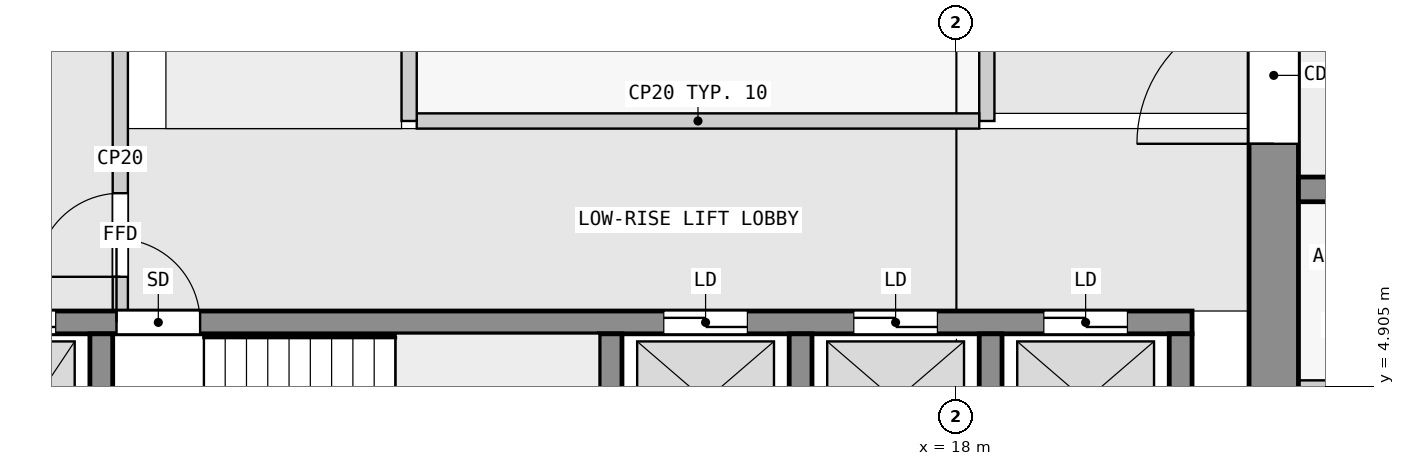
"""IFC4 building model, lengths in metres.
Left out: names, types, materials, properties, quantities, classifications, styles, units other than length and angle.
Written with IfcOpenShell. Run it as: python <this file> out.ifc"""

import sys

from ifc_helpers import new_model, si_unit, direction, frame, frame_2d, origin, place, context, subcontext, project, spatial, rectangle, extrude, element, fill, save


model = new_model("IFC4")
c1 = context("Model", 3, precision=1e-05, world=origin(), true_north=direction((0.0, 1.0)))
c2 = subcontext(c1, "Body", "Model", "MODEL_VIEW")
j1 = project(units=[si_unit("LENGTHUNIT", "METRE"), si_unit("PLANEANGLEUNIT", "RADIAN")], contexts=[c1])
p1 = place(None, origin())
s1 = spatial("IfcSite", under=j1, at=p1, CompositionType="ELEMENT")
p2 = place(p1, origin())
s2 = spatial("IfcBuilding", under=s1, at=p2, CompositionType="ELEMENT")
p3 = place(p2, frame((0.0, 0.0, 109.8)))
s3 = spatial("IfcBuildingStorey", under=s2, at=p3, CompositionType="ELEMENT", Elevation=109.8)
p4 = place(p3, frame((22.175, 2.5, 0.0), z_axis=(0.0, 0.0, 1.0), x_axis=(0.0, 1.0, 0.0)))
e1 = element("IfcWall", 1, at=p4, inside=s3, PredefinedType="SHEAR", context=c2, shape_type="SweptSolid", body=[
    extrude(rectangle(XDim=14.85, YDim=0.65, at=frame_2d((7.425, 0.0))), origin(), (0.0, 0.0, 1.0), 3.25),
])
p5 = place(p4, frame((5.6, 0.0, 0.0)))
e2 = element("IfcOpeningElement", 2, at=p5, cuts=e1, PredefinedType="OPENING", context=c2, shape_type="SweptSolid", body=[
    extrude(rectangle(XDim=1.8, YDim=2.1, at=frame_2d((0.9, 1.05))), frame((0.0, 0.335, 0.0), z_axis=(0.0, -1.0, 0.0), x_axis=(1.0, 0.0, 0.0)), (0.0, 0.0, 1.0), 0.67),
])
for number, where, z_axis, x_axis in (
    (3, (6.75, 2.8, 0.0), (0.0, 0.0, 1.0), (0.0, 1.0, 0.0)),
    (4, (13.45, 2.8, 0.0), (0.0, 0.0, 1.0), (0.0, 1.0, 0.0)),
    (5, (15.95, 2.8, 0.0), (0.0, 0.0, 1.0), (0.0, 1.0, 0.0)),
    (6, (18.45, 2.8, 0.0), (0.0, 0.0, 1.0), (0.0, 1.0, 0.0)),
    (7, (20.95, 2.8, 0.0), (0.0, 0.0, 1.0), (0.0, 1.0, 0.0)),
):
    element("IfcWall", number, at=place(p3, frame(where, z_axis=z_axis, x_axis=x_axis)), inside=s3, PredefinedType="SHEAR", context=c2, shape_type="SweptSolid", body=[
        extrude(rectangle(XDim=2.8, YDim=0.3, at=frame_2d((1.4, 0.0))), origin(), (0.0, 0.0, 1.0), 3.25),
    ])
p6 = place(p3, frame((2.3, 5.75, 0.0), z_axis=(0.0, 0.0, 1.0), x_axis=(1.0, 0.0, 0.0)))
e8 = element("IfcWall", 8, at=p6, inside=s3, PredefinedType="SHEAR", context=c2, shape_type="SweptSolid", body=[
    extrude(rectangle(XDim=18.8, YDim=0.3, at=frame_2d((9.4, 0.0))), origin(), (0.0, 0.0, 1.0), 3.25),
])
p7 = place(p6, frame((4.65, 0.0, 0.0)))
e9 = element("IfcOpeningElement", 9, at=p7, cuts=e8, PredefinedType="OPENING", context=c2, shape_type="SweptSolid", body=[
    extrude(rectangle(XDim=1.1, YDim=2.1, at=frame_2d((0.55, 1.05))), frame((0.0, 0.16, 0.0), z_axis=(0.0, -1.0, 0.0), x_axis=(1.0, 0.0, 0.0)), (0.0, 0.0, 1.0), 0.32),
])
p8 = place(p6, frame((0.45, 0.0, 0.0)))
e10 = element("IfcOpeningElement", 10, at=p8, cuts=e8, PredefinedType="OPENING", context=c2, shape_type="SweptSolid", body=[
    extrude(rectangle(XDim=1.1, YDim=2.1, at=frame_2d((0.55, 1.05))), frame((0.0, 0.16, 0.0), z_axis=(0.0, -1.0, 0.0), x_axis=(1.0, 0.0, 0.0)), (0.0, 0.0, 1.0), 0.32),
])
p9 = place(p6, frame((2.75, 0.0, 0.0)))
e11 = element("IfcOpeningElement", 11, at=p9, cuts=e8, PredefinedType="OPENING", context=c2, shape_type="SweptSolid", body=[
    extrude(rectangle(XDim=1.1, YDim=2.1, at=frame_2d((0.55, 1.05))), frame((0.0, 0.16, 0.0), z_axis=(0.0, -1.0, 0.0), x_axis=(1.0, 0.0, 0.0)), (0.0, 0.0, 1.0), 0.32),
])
p10 = place(p6, frame((11.85, 0.0, 0.0)))
e12 = element("IfcOpeningElement", 12, at=p10, cuts=e8, PredefinedType="OPENING", context=c2, shape_type="SweptSolid", body=[
    extrude(rectangle(XDim=1.1, YDim=2.1, at=frame_2d((0.55, 1.05))), frame((0.0, 0.16, 0.0), z_axis=(0.0, -1.0, 0.0), x_axis=(1.0, 0.0, 0.0)), (0.0, 0.0, 1.0), 0.32),
])
p11 = place(p6, frame((14.35, 0.0, 0.0)))
e13 = element("IfcOpeningElement", 13, at=p11, cuts=e8, PredefinedType="OPENING", context=c2, shape_type="SweptSolid", body=[
    extrude(rectangle(XDim=1.1, YDim=2.1, at=frame_2d((0.55, 1.05))), frame((0.0, 0.16, 0.0), z_axis=(0.0, -1.0, 0.0), x_axis=(1.0, 0.0, 0.0)), (0.0, 0.0, 1.0), 0.32),
])
p12 = place(p6, frame((16.85, 0.0, 0.0)))
e14 = element("IfcOpeningElement", 14, at=p12, cuts=e8, PredefinedType="OPENING", context=c2, shape_type="SweptSolid", body=[
    extrude(rectangle(XDim=1.1, YDim=2.1, at=frame_2d((0.55, 1.05))), frame((0.0, 0.16, 0.0), z_axis=(0.0, -1.0, 0.0), x_axis=(1.0, 0.0, 0.0)), (0.0, 0.0, 1.0), 0.32),
])
p13 = place(p3, frame((22.5, 7.5, 0.0), z_axis=(0.0, 0.0, 1.0), x_axis=(1.0, 0.0, 0.0)))
e15 = element("IfcWall", 15, at=p13, inside=s3, PredefinedType="SHEAR", context=c2, shape_type="SweptSolid", body=[
    extrude(rectangle(XDim=22.5, YDim=0.325, at=frame_2d((11.25, 0.0))), origin(), (0.0, 0.0, 1.0), 3.25),
])
p14 = place(p13, frame((4.05, 0.0, 0.0)))
e16 = element("IfcOpeningElement", 16, at=p14, cuts=e15, PredefinedType="OPENING", context=c2, shape_type="SweptSolid", body=[
    extrude(rectangle(XDim=1.0, YDim=2.1, at=frame_2d((0.5, 1.05))), frame((0.0, 0.172, 0.0), z_axis=(0.0, -1.0, 0.0), x_axis=(1.0, 0.0, 0.0)), (0.0, 0.0, 1.0), 0.345),
])
p15 = place(p13, frame((10.75, 0.0, 0.0)))
e17 = element("IfcOpeningElement", 17, at=p15, cuts=e15, PredefinedType="OPENING", context=c2, shape_type="SweptSolid", body=[
    extrude(rectangle(XDim=1.0, YDim=2.1, at=frame_2d((0.5, 1.05))), frame((0.0, 0.172, 0.0), z_axis=(0.0, -1.0, 0.0), x_axis=(1.0, 0.0, 0.0)), (0.0, 0.0, 1.0), 0.345),
])
p16 = place(p13, frame((16.85, 0.0, 0.0)))
e18 = element("IfcOpeningElement", 18, at=p16, cuts=e15, PredefinedType="OPENING", context=c2, shape_type="SweptSolid", body=[
    extrude(rectangle(XDim=1.0, YDim=2.1, at=frame_2d((0.5, 1.05))), frame((0.0, 0.172, 0.0), z_axis=(0.0, -1.0, 0.0), x_axis=(1.0, 0.0, 0.0)), (0.0, 0.0, 1.0), 0.345),
])
p17 = place(p3, frame((7.0, 5.9, 0.0), z_axis=(0.0, 0.0, 1.0), x_axis=(0.0, 1.0, 0.0)))
e19 = element("IfcWall", 19, at=p17, inside=s3, PredefinedType="PARTITIONING", context=c2, shape_type="SweptSolid", body=[
    extrude(rectangle(XDim=4.0, YDim=0.2, at=frame_2d((2.0, 0.0))), origin(), (0.0, 0.0, 1.0), 3.25),
])
p18 = place(p17, frame((0.45, 0.0, 0.0)))
e20 = element("IfcOpeningElement", 20, at=p18, cuts=e19, PredefinedType="OPENING", context=c2, shape_type="SweptSolid", body=[
    extrude(rectangle(XDim=1.1, YDim=2.1, at=frame_2d((0.55, 1.05))), frame((0.0, 0.11, 0.0), z_axis=(0.0, -1.0, 0.0), x_axis=(1.0, 0.0, 0.0)), (0.0, 0.0, 1.0), 0.22),
])
p19 = place(p3, frame((10.8, 8.4, 0.0), z_axis=(0.0, 0.0, 1.0), x_axis=(0.0, 1.0, 0.0)))
e21 = element("IfcWall", 21, at=p19, inside=s3, PredefinedType="PARTITIONING", context=c2, shape_type="SweptSolid", body=[
    extrude(rectangle(XDim=6.2, YDim=0.2, at=frame_2d((3.1, 0.0))), origin(), (0.0, 0.0, 1.0), 3.25),
])
p20 = place(p3, frame((10.9, 8.4, 0.0), z_axis=(0.0, 0.0, 1.0), x_axis=(1.0, 0.0, 0.0)))
e22 = element("IfcWall", 22, at=p20, inside=s3, PredefinedType="PARTITIONING", context=c2, shape_type="SweptSolid", body=[
    extrude(rectangle(XDim=7.4, YDim=0.2, at=frame_2d((3.7, 0.0))), origin(), (0.0, 0.0, 1.0), 3.25),
])
p21 = place(p3, frame((18.4, 8.4, 0.0), z_axis=(0.0, 0.0, 1.0), x_axis=(0.0, 1.0, 0.0)))
e23 = element("IfcWall", 23, at=p21, inside=s3, PredefinedType="PARTITIONING", context=c2, shape_type="SweptSolid", body=[
    extrude(rectangle(XDim=6.2, YDim=0.2, at=frame_2d((3.1, 0.0))), origin(), (0.0, 0.0, 1.0), 3.25),
])
p22 = place(p21, frame((3.15, 0.0, 0.0)))
e24 = element("IfcOpeningElement", 24, at=p22, cuts=e23, PredefinedType="OPENING", context=c2, shape_type="SweptSolid", body=[
    extrude(rectangle(XDim=0.9, YDim=2.1, at=frame_2d((0.45, 1.05))), frame((0.0, 0.11, 0.0), z_axis=(0.0, -1.0, 0.0), x_axis=(1.0, 0.0, 0.0)), (0.0, 0.0, 1.0), 0.22),
])
p23 = place(p3, frame((22.5, 4.938, 0.0), z_axis=(0.0, 0.0, 1.0), x_axis=(1.0, 0.0, 0.0)))
e25 = element("IfcWall", 25, at=p23, inside=s3, PredefinedType="PARTITIONING", context=c2, shape_type="SweptSolid", body=[
    extrude(rectangle(XDim=1.75, YDim=0.1, at=frame_2d((0.875, 0.0))), origin(), (0.0, 0.0, 1.0), 3.25),
])
p24 = place(p18, origin())
e26 = element("IfcDoor", 26, at=p24, inside=s3, OperationType="SINGLE_SWING_LEFT", PredefinedType="DOOR", context=c2, shape_type="SweptSolid", body=[
    extrude(rectangle(XDim=1.1, YDim=2.1, at=frame_2d((0.55, 1.05))), frame((0.0, 0.025, 0.0), z_axis=(0.0, -1.0, 0.0), x_axis=(1.0, 0.0, 0.0)), (0.0, 0.0, 1.0), 0.05),
])
fill(e20, e26)
p25 = place(p7, origin())
e27 = element("IfcDoor", 27, at=p25, inside=s3, OperationType="SINGLE_SWING_LEFT", PredefinedType="DOOR", context=c2, shape_type="SweptSolid", body=[
    extrude(rectangle(XDim=1.1, YDim=2.1, at=frame_2d((0.55, 1.05))), frame((0.0, 0.025, 0.0), z_axis=(0.0, -1.0, 0.0), x_axis=(1.0, 0.0, 0.0)), (0.0, 0.0, 1.0), 0.05),
])
fill(e9, e27)
p26 = place(p9, origin())
e28 = element("IfcDoor", 28, at=p26, inside=s3, OperationType="DOUBLE_DOOR_SLIDING", PredefinedType="DOOR", context=c2, shape_type="SweptSolid", body=[
    extrude(rectangle(XDim=1.1, YDim=2.1, at=frame_2d((0.55, 1.05))), frame((0.0, 0.025, 0.0), z_axis=(0.0, -1.0, 0.0), x_axis=(1.0, 0.0, 0.0)), (0.0, 0.0, 1.0), 0.05),
])
fill(e11, e28)
p27 = place(p10, origin())
e29 = element("IfcDoor", 29, at=p27, inside=s3, OperationType="DOUBLE_DOOR_SLIDING", PredefinedType="DOOR", context=c2, shape_type="SweptSolid", body=[
    extrude(rectangle(XDim=1.1, YDim=2.1, at=frame_2d((0.55, 1.05))), frame((0.0, 0.025, 0.0), z_axis=(0.0, -1.0, 0.0), x_axis=(1.0, 0.0, 0.0)), (0.0, 0.0, 1.0), 0.05),
])
fill(e12, e29)
p28 = place(p11, origin())
e30 = element("IfcDoor", 30, at=p28, inside=s3, OperationType="DOUBLE_DOOR_SLIDING", PredefinedType="DOOR", context=c2, shape_type="SweptSolid", body=[
    extrude(rectangle(XDim=1.1, YDim=2.1, at=frame_2d((0.55, 1.05))), frame((0.0, 0.025, 0.0), z_axis=(0.0, -1.0, 0.0), x_axis=(1.0, 0.0, 0.0)), (0.0, 0.0, 1.0), 0.05),
])
fill(e13, e30)
p29 = place(p12, origin())
e31 = element("IfcDoor", 31, at=p29, inside=s3, OperationType="DOUBLE_DOOR_SLIDING", PredefinedType="DOOR", context=c2, shape_type="SweptSolid", body=[
    extrude(rectangle(XDim=1.1, YDim=2.1, at=frame_2d((0.55, 1.05))), frame((0.0, 0.025, 0.0), z_axis=(0.0, -1.0, 0.0), x_axis=(1.0, 0.0, 0.0)), (0.0, 0.0, 1.0), 0.05),
])
fill(e14, e31)
p30 = place(p5, origin())
e32 = element("IfcDoor", 32, at=p30, inside=s3, OperationType="DOUBLE_DOOR_SINGLE_SWING", PredefinedType="DOOR", context=c2, shape_type="SweptSolid", body=[
    extrude(rectangle(XDim=1.8, YDim=2.1, at=frame_2d((0.9, 1.05))), frame((0.0, 0.025, 0.0), z_axis=(0.0, -1.0, 0.0), x_axis=(1.0, 0.0, 0.0)), (0.0, 0.0, 1.0), 0.05),
])
fill(e2, e32)
save(model, sys.argv[1])
